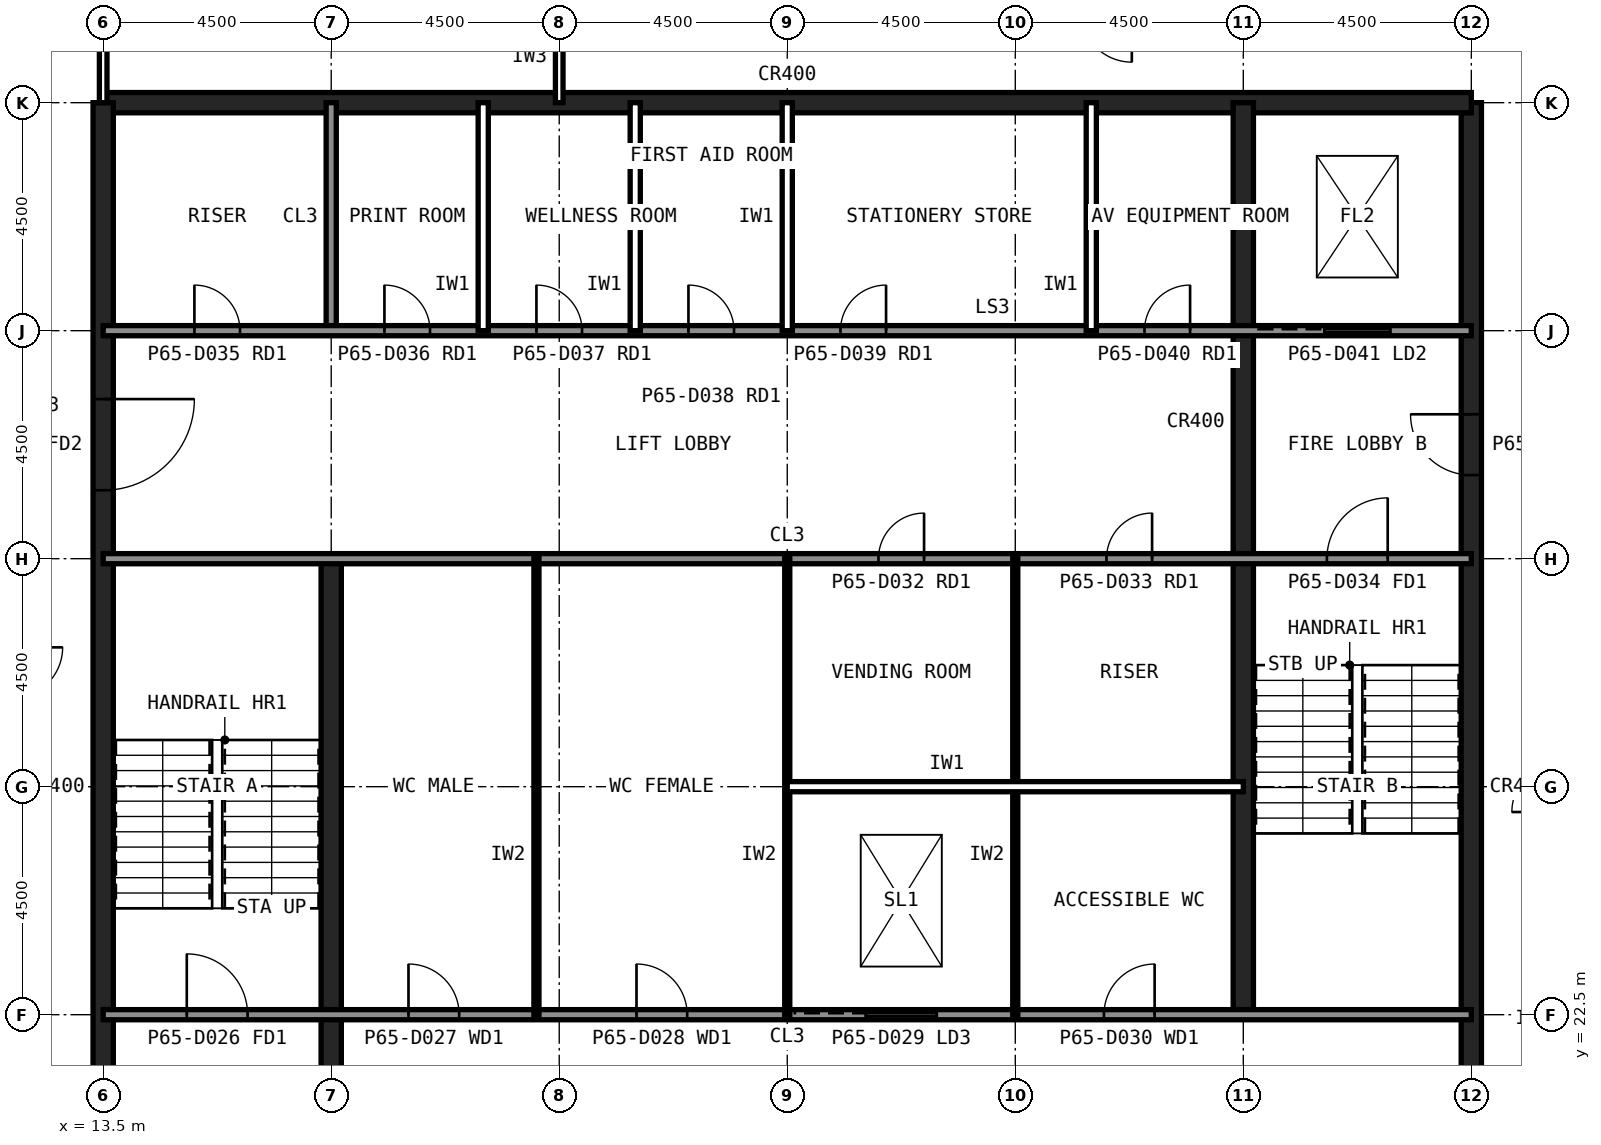
"""IFC4 building model, lengths in metres.
Left out: names, types, materials, properties, quantities, classifications, styles, units other than length and angle.
Written with IfcOpenShell. Run it as: python <this file> out.ifc"""

import sys

from ifc_helpers import new_model, si_unit, direction, frame, frame_2d, origin, place, context, subcontext, project, spatial, rectangle, extrude, element, fill, save


model = new_model("IFC4")
c1 = context("Model", 3, precision=1e-05, world=origin(), true_north=direction((0.0, 1.0)))
c2 = subcontext(c1, "Body", "Model", "MODEL_VIEW")
j1 = project(units=[si_unit("LENGTHUNIT", "METRE"), si_unit("PLANEANGLEUNIT", "RADIAN")], contexts=[c1])
p1 = place(None, origin())
s1 = spatial("IfcSite", under=j1, at=p1, CompositionType="ELEMENT")
p2 = place(p1, origin())
s2 = spatial("IfcBuilding", under=s1, at=p2, CompositionType="ELEMENT")
p3 = place(p2, frame((0.0, 0.0, 270.6)))
s3 = spatial("IfcBuildingStorey", under=s2, at=p3, CompositionType="ELEMENT", Elevation=270.6)
p4 = place(p3, frame((40.5, 13.5, 0.0), z_axis=(0.0, 0.0, 1.0), x_axis=(0.0, 1.0, 0.0)))
e1 = element("IfcWall", 1, at=p4, inside=s3, PredefinedType="SHEAR", context=c2, shape_type="SweptSolid", body=[
    extrude(rectangle(XDim=27.0, YDim=0.4, at=frame_2d((13.5, 0.0))), origin(), (0.0, 0.0, 1.0), 4.0),
])
p5 = place(p4, frame((5.85, 0.0, 0.0)))
e2 = element("IfcOpeningElement", 2, at=p5, cuts=e1, PredefinedType="OPENING", context=c2, shape_type="SweptSolid", body=[
    extrude(rectangle(XDim=1.8, YDim=2.1, at=frame_2d((0.9, 1.05))), frame((0.0, 0.21, 0.0), z_axis=(0.0, -1.0, 0.0), x_axis=(1.0, 0.0, 0.0)), (0.0, 0.0, 1.0), 0.42),
])
p6 = place(p4, frame((19.65, 0.0, 0.0)))
e3 = element("IfcOpeningElement", 3, at=p6, cuts=e1, PredefinedType="OPENING", context=c2, shape_type="SweptSolid", body=[
    extrude(rectangle(XDim=1.2, YDim=2.1, at=frame_2d((0.6, 1.05))), frame((0.0, 0.21, 0.0), z_axis=(0.0, -1.0, 0.0), x_axis=(1.0, 0.0, 0.0)), (0.0, 0.0, 1.0), 0.42),
])
p7 = place(p3, frame((40.5, 40.5, 0.0), z_axis=(0.0, 0.0, 1.0), x_axis=(-1.0, 0.0, 0.0)))
e4 = element("IfcWall", 4, at=p7, inside=s3, PredefinedType="SHEAR", context=c2, shape_type="SweptSolid", body=[
    extrude(rectangle(XDim=27.0, YDim=0.4, at=frame_2d((13.5, 0.0))), origin(), (0.0, 0.0, 1.0), 4.0),
])
p8 = place(p3, frame((13.5, 40.5, 0.0), z_axis=(0.0, 0.0, 1.0), x_axis=(0.0, -1.0, 0.0)))
e5 = element("IfcWall", 5, at=p8, inside=s3, PredefinedType="SHEAR", context=c2, shape_type="SweptSolid", body=[
    extrude(rectangle(XDim=27.0, YDim=0.4, at=frame_2d((13.5, 0.0))), origin(), (0.0, 0.0, 1.0), 4.0),
])
p9 = place(p8, frame((19.65, 0.0, 0.0)))
e6 = element("IfcOpeningElement", 6, at=p9, cuts=e5, PredefinedType="OPENING", context=c2, shape_type="SweptSolid", body=[
    extrude(rectangle(XDim=1.2, YDim=2.1, at=frame_2d((0.6, 1.05))), frame((0.0, 0.21, 0.0), z_axis=(0.0, -1.0, 0.0), x_axis=(1.0, 0.0, 0.0)), (0.0, 0.0, 1.0), 0.42),
])
p10 = place(p8, frame((5.85, 0.0, 0.0)))
e7 = element("IfcOpeningElement", 7, at=p10, cuts=e5, PredefinedType="OPENING", context=c2, shape_type="SweptSolid", body=[
    extrude(rectangle(XDim=1.8, YDim=2.1, at=frame_2d((0.9, 1.05))), frame((0.0, 0.21, 0.0), z_axis=(0.0, -1.0, 0.0), x_axis=(1.0, 0.0, 0.0)), (0.0, 0.0, 1.0), 0.42),
])
p11 = place(p3, frame((18.0, 13.5, 0.0), z_axis=(0.0, 0.0, 1.0), x_axis=(0.0, 1.0, 0.0)))
e8 = element("IfcWall", 8, at=p11, inside=s3, PredefinedType="SHEAR", context=c2, shape_type="SweptSolid", body=[
    extrude(rectangle(XDim=18.0, YDim=0.4, at=frame_2d((9.0, 0.0))), origin(), (0.0, 0.0, 1.0), 4.0),
])
p12 = place(p3, frame((18.0, 36.0, 0.0), z_axis=(0.0, 0.0, 1.0), x_axis=(0.0, 1.0, 0.0)))
e9 = element("IfcWall", 9, at=p12, inside=s3, PredefinedType="SOLIDWALL", context=c2, shape_type="SweptSolid", body=[
    extrude(rectangle(XDim=4.5, YDim=0.2, at=frame_2d((2.25, 0.0))), origin(), (0.0, 0.0, 1.0), 3.84),
])
p13 = place(p3, frame((36.0, 22.5, 0.0), z_axis=(0.0, 0.0, 1.0), x_axis=(0.0, 1.0, 0.0)))
e10 = element("IfcWall", 10, at=p13, inside=s3, PredefinedType="SHEAR", context=c2, shape_type="SweptSolid", body=[
    extrude(rectangle(XDim=18.0, YDim=0.4, at=frame_2d((9.0, 0.0))), origin(), (0.0, 0.0, 1.0), 4.0),
])
p14 = place(p3, frame((13.5, 36.0, 0.0), z_axis=(0.0, 0.0, 1.0), x_axis=(1.0, 0.0, 0.0)))
e11 = element("IfcWall", 11, at=p14, inside=s3, PredefinedType="SOLIDWALL", context=c2, shape_type="SweptSolid", body=[
    extrude(rectangle(XDim=27.0, YDim=0.2, at=frame_2d((13.5, 0.0))), origin(), (0.0, 0.0, 1.0), 3.84),
])
p15 = place(p14, frame((1.8, 0.0, 0.0)))
e12 = element("IfcOpeningElement", 12, at=p15, cuts=e11, PredefinedType="OPENING", context=c2, shape_type="SweptSolid", body=[
    extrude(rectangle(XDim=0.9, YDim=2.1, at=frame_2d((0.45, 1.05))), frame((0.0, 0.11, 0.0), z_axis=(0.0, -1.0, 0.0), x_axis=(1.0, 0.0, 0.0)), (0.0, 0.0, 1.0), 0.22),
])
p16 = place(p14, frame((5.55, 0.0, 0.0)))
e13 = element("IfcOpeningElement", 13, at=p16, cuts=e11, PredefinedType="OPENING", context=c2, shape_type="SweptSolid", body=[
    extrude(rectangle(XDim=0.9, YDim=2.1, at=frame_2d((0.45, 1.05))), frame((0.0, 0.11, 0.0), z_axis=(0.0, -1.0, 0.0), x_axis=(1.0, 0.0, 0.0)), (0.0, 0.0, 1.0), 0.22),
])
p17 = place(p14, frame((14.55, 0.0, 0.0)))
e14 = element("IfcOpeningElement", 14, at=p17, cuts=e11, PredefinedType="OPENING", context=c2, shape_type="SweptSolid", body=[
    extrude(rectangle(XDim=0.9, YDim=2.1, at=frame_2d((0.45, 1.05))), frame((0.0, 0.11, 0.0), z_axis=(0.0, -1.0, 0.0), x_axis=(1.0, 0.0, 0.0)), (0.0, 0.0, 1.0), 0.22),
])
p18 = place(p14, frame((17.55, 0.0, 0.0)))
e15 = element("IfcOpeningElement", 15, at=p18, cuts=e11, PredefinedType="OPENING", context=c2, shape_type="SweptSolid", body=[
    extrude(rectangle(XDim=0.9, YDim=2.1, at=frame_2d((0.45, 1.05))), frame((0.0, 0.11, 0.0), z_axis=(0.0, -1.0, 0.0), x_axis=(1.0, 0.0, 0.0)), (0.0, 0.0, 1.0), 0.22),
])
p19 = place(p14, frame((20.55, 0.0, 0.0)))
e16 = element("IfcOpeningElement", 16, at=p19, cuts=e11, PredefinedType="OPENING", context=c2, shape_type="SweptSolid", body=[
    extrude(rectangle(XDim=0.9, YDim=2.1, at=frame_2d((0.45, 1.05))), frame((0.0, 0.11, 0.0), z_axis=(0.0, -1.0, 0.0), x_axis=(1.0, 0.0, 0.0)), (0.0, 0.0, 1.0), 0.22),
])
p20 = place(p14, frame((24.1, 0.0, 0.0)))
e17 = element("IfcOpeningElement", 17, at=p20, cuts=e11, PredefinedType="OPENING", context=c2, shape_type="SweptSolid", body=[
    extrude(rectangle(XDim=1.3, YDim=2.2, at=frame_2d((0.65, 1.1))), frame((0.0, 0.11, 0.0), z_axis=(0.0, -1.0, 0.0), x_axis=(1.0, 0.0, 0.0)), (0.0, 0.0, 1.0), 0.22),
])
p21 = place(p3, frame((13.5, 22.5, 0.0), z_axis=(0.0, 0.0, 1.0), x_axis=(1.0, 0.0, 0.0)))
e18 = element("IfcWall", 18, at=p21, inside=s3, PredefinedType="SOLIDWALL", context=c2, shape_type="SweptSolid", body=[
    extrude(rectangle(XDim=27.0, YDim=0.2, at=frame_2d((13.5, 0.0))), origin(), (0.0, 0.0, 1.0), 3.84),
])
p22 = place(p21, frame((1.65, 0.0, 0.0)))
e19 = element("IfcOpeningElement", 19, at=p22, cuts=e18, PredefinedType="OPENING", context=c2, shape_type="SweptSolid", body=[
    extrude(rectangle(XDim=1.2, YDim=2.1, at=frame_2d((0.6, 1.05))), frame((0.0, 0.11, 0.0), z_axis=(0.0, -1.0, 0.0), x_axis=(1.0, 0.0, 0.0)), (0.0, 0.0, 1.0), 0.22),
])
p23 = place(p21, frame((6.025, 0.0, 0.0)))
e20 = element("IfcOpeningElement", 20, at=p23, cuts=e18, PredefinedType="OPENING", context=c2, shape_type="SweptSolid", body=[
    extrude(rectangle(XDim=1.0, YDim=2.1, at=frame_2d((0.5, 1.05))), frame((0.0, 0.11, 0.0), z_axis=(0.0, -1.0, 0.0), x_axis=(1.0, 0.0, 0.0)), (0.0, 0.0, 1.0), 0.22),
])
p24 = place(p21, frame((10.525, 0.0, 0.0)))
e21 = element("IfcOpeningElement", 21, at=p24, cuts=e18, PredefinedType="OPENING", context=c2, shape_type="SweptSolid", body=[
    extrude(rectangle(XDim=1.0, YDim=2.1, at=frame_2d((0.5, 1.05))), frame((0.0, 0.11, 0.0), z_axis=(0.0, -1.0, 0.0), x_axis=(1.0, 0.0, 0.0)), (0.0, 0.0, 1.0), 0.22),
])
p25 = place(p21, frame((19.75, 0.0, 0.0)))
e22 = element("IfcOpeningElement", 22, at=p25, cuts=e18, PredefinedType="OPENING", context=c2, shape_type="SweptSolid", body=[
    extrude(rectangle(XDim=1.0, YDim=2.1, at=frame_2d((0.5, 1.05))), frame((0.0, 0.11, 0.0), z_axis=(0.0, -1.0, 0.0), x_axis=(1.0, 0.0, 0.0)), (0.0, 0.0, 1.0), 0.22),
])
p26 = place(p21, frame((15.05, 0.0, 0.0)))
e23 = element("IfcOpeningElement", 23, at=p26, cuts=e18, PredefinedType="OPENING", context=c2, shape_type="SweptSolid", body=[
    extrude(rectangle(XDim=1.4, YDim=2.4, at=frame_2d((0.7, 1.2))), frame((0.0, 0.11, 0.0), z_axis=(0.0, -1.0, 0.0), x_axis=(1.0, 0.0, 0.0)), (0.0, 0.0, 1.0), 0.22),
])
p27 = place(p3, frame((13.5, 31.5, 0.0), z_axis=(0.0, 0.0, 1.0), x_axis=(1.0, 0.0, 0.0)))
e24 = element("IfcWall", 24, at=p27, inside=s3, PredefinedType="SOLIDWALL", context=c2, shape_type="SweptSolid", body=[
    extrude(rectangle(XDim=27.0, YDim=0.2, at=frame_2d((13.5, 0.0))), origin(), (0.0, 0.0, 1.0), 3.84),
])
p28 = place(p27, frame((24.15, 0.0, 0.0)))
e25 = element("IfcOpeningElement", 25, at=p28, cuts=e24, PredefinedType="OPENING", context=c2, shape_type="SweptSolid", body=[
    extrude(rectangle(XDim=1.2, YDim=2.1, at=frame_2d((0.6, 1.05))), frame((0.0, 0.11, 0.0), z_axis=(0.0, -1.0, 0.0), x_axis=(1.0, 0.0, 0.0)), (0.0, 0.0, 1.0), 0.22),
])
p29 = place(p27, frame((15.3, 0.0, 0.0)))
e26 = element("IfcOpeningElement", 26, at=p29, cuts=e24, PredefinedType="OPENING", context=c2, shape_type="SweptSolid", body=[
    extrude(rectangle(XDim=0.9, YDim=2.1, at=frame_2d((0.45, 1.05))), frame((0.0, 0.11, 0.0), z_axis=(0.0, -1.0, 0.0), x_axis=(1.0, 0.0, 0.0)), (0.0, 0.0, 1.0), 0.22),
])
p30 = place(p27, frame((19.8, 0.0, 0.0)))
e27 = element("IfcOpeningElement", 27, at=p30, cuts=e24, PredefinedType="OPENING", context=c2, shape_type="SweptSolid", body=[
    extrude(rectangle(XDim=0.9, YDim=2.1, at=frame_2d((0.45, 1.05))), frame((0.0, 0.11, 0.0), z_axis=(0.0, -1.0, 0.0), x_axis=(1.0, 0.0, 0.0)), (0.0, 0.0, 1.0), 0.22),
])
for number, where, z_axis, x_axis in (
    (28, (27.0, 36.0, 0.0), (0.0, 0.0, 1.0), (0.0, 1.0, 0.0)),
    (29, (30.0, 36.0, 0.0), (0.0, 0.0, 1.0), (0.0, 1.0, 0.0)),
    (30, (33.0, 36.0, 0.0), (0.0, 0.0, 1.0), (0.0, 1.0, 0.0)),
):
    element("IfcWall", number, at=place(p3, frame(where, z_axis=z_axis, x_axis=x_axis)), inside=s3, PredefinedType="PARTITIONING", context=c2, shape_type="SweptSolid", body=[
        extrude(rectangle(XDim=4.5, YDim=0.2, at=frame_2d((2.25, 0.0))), origin(), (0.0, 0.0, 1.0), 3.84),
    ])
for number, where, z_axis, x_axis in (
    (31, (22.05, 22.5, 0.0), (0.0, 0.0, 1.0), (0.0, 1.0, 0.0)),
    (32, (27.0, 22.5, 0.0), (0.0, 0.0, 1.0), (0.0, 1.0, 0.0)),
    (33, (31.5, 22.5, 0.0), (0.0, 0.0, 1.0), (0.0, 1.0, 0.0)),
):
    element("IfcWall", number, at=place(p3, frame(where, z_axis=z_axis, x_axis=x_axis)), inside=s3, PredefinedType="PLUMBINGWALL", context=c2, shape_type="SweptSolid", body=[
        extrude(rectangle(XDim=9.0, YDim=0.1, at=frame_2d((4.5, 0.0))), origin(), (0.0, 0.0, 1.0), 3.84),
    ])
p31 = place(p3, frame((27.0, 27.0, 0.0), z_axis=(0.0, 0.0, 1.0), x_axis=(1.0, 0.0, 0.0)))
e34 = element("IfcWall", 34, at=p31, inside=s3, PredefinedType="PARTITIONING", context=c2, shape_type="SweptSolid", body=[
    extrude(rectangle(XDim=9.0, YDim=0.2, at=frame_2d((4.5, 0.0))), origin(), (0.0, 0.0, 1.0), 3.84),
])
p32 = place(p3, frame((22.5, 40.5, 0.0), z_axis=(0.0, 0.0, 1.0), x_axis=(0.0, 1.0, 0.0)))
e35 = element("IfcWall", 35, at=p32, inside=s3, PredefinedType="PARTITIONING", context=c2, shape_type="SweptSolid", body=[
    extrude(rectangle(XDim=4.5, YDim=0.15, at=frame_2d((2.25, 0.0))), origin(), (0.0, 0.0, 1.0), 2.989),
])
p33 = place(p32, frame((1.75, 0.0, 0.0)))
e36 = element("IfcOpeningElement", 36, at=p33, cuts=e35, PredefinedType="OPENING", context=c2, shape_type="SweptSolid", body=[
    extrude(rectangle(XDim=1.0, YDim=2.1, at=frame_2d((0.5, 1.05))), frame((0.0, 0.085, 0.0), z_axis=(0.0, -1.0, 0.0), x_axis=(1.0, 0.0, 0.0)), (0.0, 0.0, 1.0), 0.17),
])
p34 = place(p3, frame((13.5, 45.0, 0.0), z_axis=(0.0, 0.0, 1.0), x_axis=(0.0, -1.0, 0.0)))
e37 = element("IfcWall", 37, at=p34, inside=s3, PredefinedType="PARTITIONING", context=c2, shape_type="SweptSolid", body=[
    extrude(rectangle(XDim=4.5, YDim=0.15, at=frame_2d((2.25, 0.0))), origin(), (0.0, 0.0, 1.0), 2.989),
])
p35 = place(p10, origin())
e38 = element("IfcDoor", 38, at=p35, inside=s3, OperationType="SINGLE_SWING_LEFT", PredefinedType="DOOR", context=c2, shape_type="SweptSolid", body=[
    extrude(rectangle(XDim=1.8, YDim=2.1, at=frame_2d((0.9, 1.05))), frame((0.0, 0.025, 0.0), z_axis=(0.0, -1.0, 0.0), x_axis=(1.0, 0.0, 0.0)), (0.0, 0.0, 1.0), 0.05),
])
fill(e7, e38)
p36 = place(p6, origin())
e39 = element("IfcDoor", 39, at=p36, inside=s3, OperationType="SINGLE_SWING_RIGHT", PredefinedType="DOOR", context=c2, shape_type="SweptSolid", body=[
    extrude(rectangle(XDim=1.2, YDim=2.1, at=frame_2d((0.6, 1.05))), frame((0.0, 0.025, 0.0), z_axis=(0.0, -1.0, 0.0), x_axis=(1.0, 0.0, 0.0)), (0.0, 0.0, 1.0), 0.05),
])
fill(e3, e39)
p37 = place(p22, origin())
e40 = element("IfcDoor", 40, at=p37, inside=s3, OperationType="SINGLE_SWING_LEFT", PredefinedType="DOOR", context=c2, shape_type="SweptSolid", body=[
    extrude(rectangle(XDim=1.2, YDim=2.1, at=frame_2d((0.6, 1.05))), frame((0.0, 0.025, 0.0), z_axis=(0.0, -1.0, 0.0), x_axis=(1.0, 0.0, 0.0)), (0.0, 0.0, 1.0), 0.05),
])
fill(e19, e40)
p38 = place(p28, origin())
e41 = element("IfcDoor", 41, at=p38, inside=s3, OperationType="SINGLE_SWING_RIGHT", PredefinedType="DOOR", context=c2, shape_type="SweptSolid", body=[
    extrude(rectangle(XDim=1.2, YDim=2.1, at=frame_2d((0.6, 1.05))), frame((0.0, 0.025, 0.0), z_axis=(0.0, -1.0, 0.0), x_axis=(1.0, 0.0, 0.0)), (0.0, 0.0, 1.0), 0.05),
])
fill(e25, e41)
p39 = place(p23, origin())
e42 = element("IfcDoor", 42, at=p39, inside=s3, OperationType="SINGLE_SWING_LEFT", PredefinedType="DOOR", context=c2, shape_type="SweptSolid", body=[
    extrude(rectangle(XDim=1.0, YDim=2.1, at=frame_2d((0.5, 1.05))), frame((0.0, 0.025, 0.0), z_axis=(0.0, -1.0, 0.0), x_axis=(1.0, 0.0, 0.0)), (0.0, 0.0, 1.0), 0.05),
])
fill(e20, e42)
p40 = place(p24, origin())
e43 = element("IfcDoor", 43, at=p40, inside=s3, OperationType="SINGLE_SWING_LEFT", PredefinedType="DOOR", context=c2, shape_type="SweptSolid", body=[
    extrude(rectangle(XDim=1.0, YDim=2.1, at=frame_2d((0.5, 1.05))), frame((0.0, 0.025, 0.0), z_axis=(0.0, -1.0, 0.0), x_axis=(1.0, 0.0, 0.0)), (0.0, 0.0, 1.0), 0.05),
])
fill(e21, e43)
p41 = place(p25, origin())
e44 = element("IfcDoor", 44, at=p41, inside=s3, OperationType="SINGLE_SWING_RIGHT", PredefinedType="DOOR", context=c2, shape_type="SweptSolid", body=[
    extrude(rectangle(XDim=1.0, YDim=2.1, at=frame_2d((0.5, 1.05))), frame((0.0, 0.025, 0.0), z_axis=(0.0, -1.0, 0.0), x_axis=(1.0, 0.0, 0.0)), (0.0, 0.0, 1.0), 0.05),
])
fill(e22, e44)
p42 = place(p29, origin())
e45 = element("IfcDoor", 45, at=p42, inside=s3, OperationType="SINGLE_SWING_RIGHT", PredefinedType="DOOR", context=c2, shape_type="SweptSolid", body=[
    extrude(rectangle(XDim=0.9, YDim=2.1, at=frame_2d((0.45, 1.05))), frame((0.0, 0.025, 0.0), z_axis=(0.0, -1.0, 0.0), x_axis=(1.0, 0.0, 0.0)), (0.0, 0.0, 1.0), 0.05),
])
fill(e26, e45)
p43 = place(p30, origin())
e46 = element("IfcDoor", 46, at=p43, inside=s3, OperationType="SINGLE_SWING_RIGHT", PredefinedType="DOOR", context=c2, shape_type="SweptSolid", body=[
    extrude(rectangle(XDim=0.9, YDim=2.1, at=frame_2d((0.45, 1.05))), frame((0.0, 0.025, 0.0), z_axis=(0.0, -1.0, 0.0), x_axis=(1.0, 0.0, 0.0)), (0.0, 0.0, 1.0), 0.05),
])
fill(e27, e46)
p44 = place(p15, origin())
e47 = element("IfcDoor", 47, at=p44, inside=s3, OperationType="SINGLE_SWING_LEFT", PredefinedType="DOOR", context=c2, shape_type="SweptSolid", body=[
    extrude(rectangle(XDim=0.9, YDim=2.1, at=frame_2d((0.45, 1.05))), frame((0.0, 0.025, 0.0), z_axis=(0.0, -1.0, 0.0), x_axis=(1.0, 0.0, 0.0)), (0.0, 0.0, 1.0), 0.05),
])
fill(e12, e47)
p45 = place(p16, origin())
e48 = element("IfcDoor", 48, at=p45, inside=s3, OperationType="SINGLE_SWING_LEFT", PredefinedType="DOOR", context=c2, shape_type="SweptSolid", body=[
    extrude(rectangle(XDim=0.9, YDim=2.1, at=frame_2d((0.45, 1.05))), frame((0.0, 0.025, 0.0), z_axis=(0.0, -1.0, 0.0), x_axis=(1.0, 0.0, 0.0)), (0.0, 0.0, 1.0), 0.05),
])
fill(e13, e48)
p46 = place(p17, origin())
e49 = element("IfcDoor", 49, at=p46, inside=s3, OperationType="SINGLE_SWING_RIGHT", PredefinedType="DOOR", context=c2, shape_type="SweptSolid", body=[
    extrude(rectangle(XDim=0.9, YDim=2.1, at=frame_2d((0.45, 1.05))), frame((0.0, 0.025, 0.0), z_axis=(0.0, -1.0, 0.0), x_axis=(1.0, 0.0, 0.0)), (0.0, 0.0, 1.0), 0.05),
])
fill(e14, e49)
p47 = place(p18, origin())
e50 = element("IfcDoor", 50, at=p47, inside=s3, OperationType="SINGLE_SWING_RIGHT", PredefinedType="DOOR", context=c2, shape_type="SweptSolid", body=[
    extrude(rectangle(XDim=0.9, YDim=2.1, at=frame_2d((0.45, 1.05))), frame((0.0, 0.025, 0.0), z_axis=(0.0, -1.0, 0.0), x_axis=(1.0, 0.0, 0.0)), (0.0, 0.0, 1.0), 0.05),
])
fill(e15, e50)
p48 = place(p19, origin())
e51 = element("IfcDoor", 51, at=p48, inside=s3, OperationType="SINGLE_SWING_RIGHT", PredefinedType="DOOR", context=c2, shape_type="SweptSolid", body=[
    extrude(rectangle(XDim=0.9, YDim=2.1, at=frame_2d((0.45, 1.05))), frame((0.0, 0.025, 0.0), z_axis=(0.0, -1.0, 0.0), x_axis=(1.0, 0.0, 0.0)), (0.0, 0.0, 1.0), 0.05),
])
fill(e16, e51)
p49 = place(p20, origin())
e52 = element("IfcDoor", 52, at=p49, inside=s3, OperationType="SLIDING_TO_LEFT", PredefinedType="DOOR", context=c2, shape_type="SweptSolid", body=[
    extrude(rectangle(XDim=1.3, YDim=2.2, at=frame_2d((0.65, 1.1))), frame((0.0, 0.025, 0.0), z_axis=(0.0, -1.0, 0.0), x_axis=(1.0, 0.0, 0.0)), (0.0, 0.0, 1.0), 0.05),
])
fill(e17, e52)
p50 = place(p26, origin())
e53 = element("IfcDoor", 53, at=p50, inside=s3, OperationType="SLIDING_TO_LEFT", PredefinedType="DOOR", context=c2, shape_type="SweptSolid", body=[
    extrude(rectangle(XDim=1.4, YDim=2.4, at=frame_2d((0.7, 1.2))), frame((0.0, 0.025, 0.0), z_axis=(0.0, -1.0, 0.0), x_axis=(1.0, 0.0, 0.0)), (0.0, 0.0, 1.0), 0.05),
])
fill(e23, e53)
save(model, sys.argv[1])
